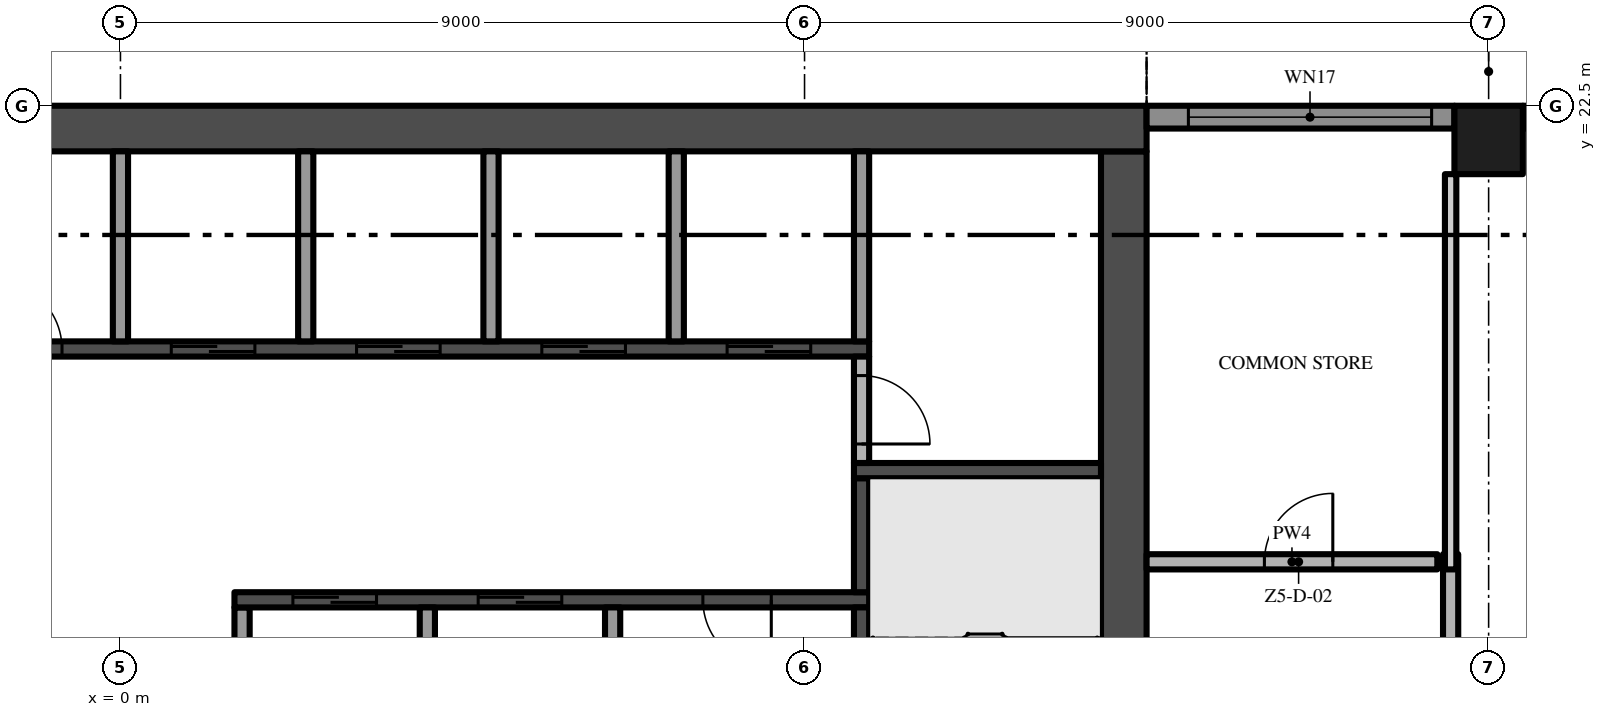
"""IFC4 building model, lengths in metres.
Left out: names, types, materials, properties, quantities, classifications, styles, units other than length and angle.
Written with IfcOpenShell. Run it as: python <this file> out.ifc"""

import sys

from ifc_helpers import new_model, si_unit, direction, frame, frame_2d, origin, origin_2d, place, context, subcontext, project, spatial, rectangle, extrude, element, fill, save


model = new_model("IFC4")
c1 = context("Model", 3, precision=1e-05, world=origin(), true_north=direction((0.0, 1.0)))
c2 = subcontext(c1, "Body", "Model", "MODEL_VIEW")
j1 = project(units=[si_unit("LENGTHUNIT", "METRE"), si_unit("PLANEANGLEUNIT", "RADIAN")], contexts=[c1])
p1 = place(None, origin())
s1 = spatial("IfcSite", under=j1, at=p1, CompositionType="ELEMENT")
p2 = place(p1, origin())
s2 = spatial("IfcBuilding", under=s1, at=p2, CompositionType="ELEMENT")
p3 = place(p2, frame((0.0, 0.0, 273.0)))
s3 = spatial("IfcBuildingStorey", under=s2, at=p3, CompositionType="ELEMENT", Elevation=273.0)
p4 = place(p3, frame((13.2, 5.1, -0.3), z_axis=(0.0, 0.0, 1.0), x_axis=(0.0, 1.0, 0.0)))
e1 = element("IfcWall", 1, at=p4, inside=s3, PredefinedType="SHEAR", context=c2, shape_type="SweptSolid", body=[
    extrude(rectangle(XDim=16.8, YDim=0.6, at=frame_2d((8.4, 0.0))), origin(), (0.0, 0.0, 1.0), 3.8),
])
p5 = place(p4, frame((6.3, 0.0, 0.3)))
e2 = element("IfcOpeningElement", 2, at=p5, cuts=e1, PredefinedType="OPENING", context=c2, shape_type="SweptSolid", body=[
    extrude(rectangle(XDim=1.2, YDim=2.2, at=frame_2d((0.6, 1.1))), frame((0.0, 0.31, 0.0), z_axis=(0.0, -1.0, 0.0), x_axis=(1.0, 0.0, 0.0)), (0.0, 0.0, 1.0), 0.62),
])
p6 = place(p3, frame((13.5, 22.2, -0.3), z_axis=(0.0, 0.0, 1.0), x_axis=(-1.0, 0.0, 0.0)))
e3 = element("IfcWall", 3, at=p6, inside=s3, PredefinedType="SHEAR", context=c2, shape_type="SweptSolid", body=[
    extrude(rectangle(XDim=27.0, YDim=0.6, at=frame_2d((13.5, 0.0))), origin(), (0.0, 0.0, 1.0), 3.8),
])
p7 = place(p3, frame((18.0, 22.05, 0.0), z_axis=(0.0, 0.0, 1.0), x_axis=(1.0, 0.0, 0.0)))
e4 = element("IfcColumn", 4, at=p7, inside=s3, PredefinedType="COLUMN", context=c2, shape_type="SweptSolid", body=[
    extrude(rectangle(XDim=0.9, YDim=0.9, at=origin_2d()), origin(), (0.0, 0.0, 1.0), 3.5),
])
p8 = place(p3, frame((18.45, 22.35, 0.0), z_axis=(0.0, 0.0, 1.0), x_axis=(1.0, 0.0, 0.0)))
e5 = element("IfcWall", 5, at=p8, inside=s3, PredefinedType="SOLIDWALL", context=c2, shape_type="SweptSolid", body=[
    extrude(rectangle(XDim=3.75, YDim=0.3, at=frame_2d((1.875, 0.0))), origin(), (0.0, 0.0, 1.0), 3.5),
])
p9 = place(p8, frame((0.3, 0.0, 0.0)))
e6 = element("IfcOpeningElement", 6, at=p9, cuts=e5, PredefinedType="OPENING", context=c2, shape_type="SweptSolid", body=[
    extrude(rectangle(XDim=3.15, YDim=2.4, at=frame_2d((1.575, 1.2))), frame((0.0, 0.16, 0.0), z_axis=(0.0, -1.0, 0.0), x_axis=(1.0, 0.0, 0.0)), (0.0, 0.0, 1.0), 0.32),
])
p10 = place(p3, frame((13.5, 22.35, 0.0), z_axis=(0.0, 0.0, 1.0), x_axis=(1.0, 0.0, 0.0)))
e7 = element("IfcWall", 7, at=p10, inside=s3, PredefinedType="SOLIDWALL", context=c2, shape_type="SweptSolid", body=[
    extrude(rectangle(XDim=4.05, YDim=0.3, at=frame_2d((2.025, 0.0))), origin(), (0.0, 0.0, 1.0), 3.5),
])
p11 = place(p10, frame((0.55, 0.0, 0.45)))
e8 = element("IfcOpeningElement", 8, at=p11, cuts=e7, PredefinedType="OPENING", context=c2, shape_type="SweptSolid", body=[
    extrude(rectangle(XDim=3.2, YDim=2.65, at=frame_2d((1.6, 1.325))), frame((0.0, 0.16, 0.0), z_axis=(0.0, -1.0, 0.0), x_axis=(1.0, 0.0, 0.0)), (0.0, 0.0, 1.0), 0.32),
])
p12 = place(p3, frame((-9.85, 19.3, 0.0), z_axis=(0.0, 0.0, 1.0), x_axis=(1.0, 0.0, 0.0)))
e9 = element("IfcWall", 9, at=p12, inside=s3, PredefinedType="SHEAR", context=c2, shape_type="SweptSolid", body=[
    extrude(rectangle(XDim=19.7, YDim=0.2, at=frame_2d((9.85, 0.0))), origin(), (0.0, 0.0, 1.0), 3.5),
])
p13 = place(p12, frame((10.519, 0.0, 0.0)))
e10 = element("IfcOpeningElement", 10, at=p13, cuts=e9, PredefinedType="OPENING", context=c2, shape_type="SweptSolid", body=[
    extrude(rectangle(XDim=1.1, YDim=2.1, at=frame_2d((0.55, 1.05))), frame((0.0, 0.11, 0.0), z_axis=(0.0, -1.0, 0.0), x_axis=(1.0, 0.0, 0.0)), (0.0, 0.0, 1.0), 0.22),
])
p14 = place(p12, frame((12.956, 0.0, 0.0)))
e11 = element("IfcOpeningElement", 11, at=p14, cuts=e9, PredefinedType="OPENING", context=c2, shape_type="SweptSolid", body=[
    extrude(rectangle(XDim=1.1, YDim=2.1, at=frame_2d((0.55, 1.05))), frame((0.0, 0.11, 0.0), z_axis=(0.0, -1.0, 0.0), x_axis=(1.0, 0.0, 0.0)), (0.0, 0.0, 1.0), 0.22),
])
p15 = place(p12, frame((15.394, 0.0, 0.0)))
e12 = element("IfcOpeningElement", 12, at=p15, cuts=e9, PredefinedType="OPENING", context=c2, shape_type="SweptSolid", body=[
    extrude(rectangle(XDim=1.1, YDim=2.1, at=frame_2d((0.55, 1.05))), frame((0.0, 0.11, 0.0), z_axis=(0.0, -1.0, 0.0), x_axis=(1.0, 0.0, 0.0)), (0.0, 0.0, 1.0), 0.22),
])
p16 = place(p12, frame((17.831, 0.0, 0.0)))
e13 = element("IfcOpeningElement", 13, at=p16, cuts=e9, PredefinedType="OPENING", context=c2, shape_type="SweptSolid", body=[
    extrude(rectangle(XDim=1.1, YDim=2.1, at=frame_2d((0.55, 1.05))), frame((0.0, 0.11, 0.0), z_axis=(0.0, -1.0, 0.0), x_axis=(1.0, 0.0, 0.0)), (0.0, 0.0, 1.0), 0.22),
])
p17 = place(p12, frame((0.869, 0.0, 0.0)))
e14 = element("IfcOpeningElement", 14, at=p17, cuts=e9, PredefinedType="OPENING", context=c2, shape_type="SweptSolid", body=[
    extrude(rectangle(XDim=0.9, YDim=2.1, at=frame_2d((0.45, 1.05))), frame((0.0, 0.11, 0.0), z_axis=(0.0, -1.0, 0.0), x_axis=(1.0, 0.0, 0.0)), (0.0, 0.0, 1.0), 0.22),
])
p18 = place(p12, frame((4.525, 0.0, 0.0)))
e15 = element("IfcOpeningElement", 15, at=p18, cuts=e9, PredefinedType="OPENING", context=c2, shape_type="SweptSolid", body=[
    extrude(rectangle(XDim=0.9, YDim=2.1, at=frame_2d((0.45, 1.05))), frame((0.0, 0.11, 0.0), z_axis=(0.0, -1.0, 0.0), x_axis=(1.0, 0.0, 0.0)), (0.0, 0.0, 1.0), 0.22),
])
p19 = place(p12, frame((8.181, 0.0, 0.0)))
e16 = element("IfcOpeningElement", 16, at=p19, cuts=e9, PredefinedType="OPENING", context=c2, shape_type="SweptSolid", body=[
    extrude(rectangle(XDim=0.9, YDim=2.1, at=frame_2d((0.45, 1.05))), frame((0.0, 0.11, 0.0), z_axis=(0.0, -1.0, 0.0), x_axis=(1.0, 0.0, 0.0)), (0.0, 0.0, 1.0), 0.22),
])
p20 = place(p3, frame((0.0, 19.4, 0.0), z_axis=(0.0, 0.0, 1.0), x_axis=(0.0, 1.0, 0.0)))
e17 = element("IfcWall", 17, at=p20, inside=s3, PredefinedType="PARTITIONING", context=c2, shape_type="SweptSolid", body=[
    extrude(rectangle(XDim=2.5, YDim=0.2, at=frame_2d((1.25, 0.0))), origin(), (0.0, 0.0, 1.0), 3.5),
])
p21 = place(p3, frame((1.6, 13.7, 0.0), z_axis=(0.0, 0.0, 1.0), x_axis=(0.0, 1.0, 0.0)))
e18 = element("IfcWall", 18, at=p21, inside=s3, PredefinedType="PARTITIONING", context=c2, shape_type="SweptSolid", body=[
    extrude(rectangle(XDim=2.2, YDim=0.2, at=frame_2d((1.1, 0.0))), origin(), (0.0, 0.0, 1.0), 3.5),
])
p22 = place(p3, frame((9.85, 16.0, 0.0), z_axis=(0.0, 0.0, 1.0), x_axis=(-1.0, 0.0, 0.0)))
e19 = element("IfcWall", 19, at=p22, inside=s3, PredefinedType="SHEAR", context=c2, shape_type="SweptSolid", body=[
    extrude(rectangle(XDim=8.35, YDim=0.2, at=frame_2d((4.175, 0.0))), origin(), (0.0, 0.0, 1.0), 3.5),
])
p23 = place(p22, frame((6.481, 0.0, 0.0)))
e20 = element("IfcOpeningElement", 20, at=p23, cuts=e19, PredefinedType="OPENING", context=c2, shape_type="SweptSolid", body=[
    extrude(rectangle(XDim=1.1, YDim=2.1, at=frame_2d((0.55, 1.05))), frame((0.0, 0.11, 0.0), z_axis=(0.0, -1.0, 0.0), x_axis=(1.0, 0.0, 0.0)), (0.0, 0.0, 1.0), 0.22),
])
p24 = place(p22, frame((4.044, 0.0, 0.0)))
e21 = element("IfcOpeningElement", 21, at=p24, cuts=e19, PredefinedType="OPENING", context=c2, shape_type="SweptSolid", body=[
    extrude(rectangle(XDim=1.1, YDim=2.1, at=frame_2d((0.55, 1.05))), frame((0.0, 0.11, 0.0), z_axis=(0.0, -1.0, 0.0), x_axis=(1.0, 0.0, 0.0)), (0.0, 0.0, 1.0), 0.22),
])
p25 = place(p22, frame((1.288, 0.0, 0.0)))
e22 = element("IfcOpeningElement", 22, at=p25, cuts=e19, PredefinedType="OPENING", context=c2, shape_type="SweptSolid", body=[
    extrude(rectangle(XDim=0.9, YDim=2.1, at=frame_2d((0.45, 1.05))), frame((0.0, 0.11, 0.0), z_axis=(0.0, -1.0, 0.0), x_axis=(1.0, 0.0, 0.0)), (0.0, 0.0, 1.0), 0.22),
])
p26 = place(p3, frame((2.438, 19.4, 0.0), z_axis=(0.0, 0.0, 1.0), x_axis=(0.0, 1.0, 0.0)))
e23 = element("IfcWall", 23, at=p26, inside=s3, PredefinedType="PARTITIONING", context=c2, shape_type="SweptSolid", body=[
    extrude(rectangle(XDim=2.5, YDim=0.2, at=frame_2d((1.25, 0.0))), origin(), (0.0, 0.0, 1.0), 3.5),
])
p27 = place(p3, frame((4.037, 13.7, 0.0), z_axis=(0.0, 0.0, 1.0), x_axis=(0.0, 1.0, 0.0)))
e24 = element("IfcWall", 24, at=p27, inside=s3, PredefinedType="PARTITIONING", context=c2, shape_type="SweptSolid", body=[
    extrude(rectangle(XDim=2.2, YDim=0.2, at=frame_2d((1.1, 0.0))), origin(), (0.0, 0.0, 1.0), 3.5),
])
p28 = place(p3, frame((4.875, 19.4, 0.0), z_axis=(0.0, 0.0, 1.0), x_axis=(0.0, 1.0, 0.0)))
e25 = element("IfcWall", 25, at=p28, inside=s3, PredefinedType="PARTITIONING", context=c2, shape_type="SweptSolid", body=[
    extrude(rectangle(XDim=2.5, YDim=0.2, at=frame_2d((1.25, 0.0))), origin(), (0.0, 0.0, 1.0), 3.5),
])
p29 = place(p3, frame((6.475, 13.7, 0.0), z_axis=(0.0, 0.0, 1.0), x_axis=(0.0, 1.0, 0.0)))
e26 = element("IfcWall", 26, at=p29, inside=s3, PredefinedType="PARTITIONING", context=c2, shape_type="SweptSolid", body=[
    extrude(rectangle(XDim=2.2, YDim=0.2, at=frame_2d((1.1, 0.0))), origin(), (0.0, 0.0, 1.0), 3.5),
])
p30 = place(p3, frame((7.312, 19.4, 0.0), z_axis=(0.0, 0.0, 1.0), x_axis=(0.0, 1.0, 0.0)))
e27 = element("IfcWall", 27, at=p30, inside=s3, PredefinedType="PARTITIONING", context=c2, shape_type="SweptSolid", body=[
    extrude(rectangle(XDim=2.5, YDim=0.2, at=frame_2d((1.25, 0.0))), origin(), (0.0, 0.0, 1.0), 3.5),
])
p31 = place(p3, frame((9.75, 12.3, 0.0), z_axis=(0.0, 0.0, 1.0), x_axis=(0.0, 1.0, 0.0)))
e28 = element("IfcWall", 28, at=p31, inside=s3, PredefinedType="SHEAR", context=c2, shape_type="SweptSolid", body=[
    extrude(rectangle(XDim=3.6, YDim=0.2, at=frame_2d((1.8, 0.0))), origin(), (0.0, 0.0, 1.0), 3.5),
])
p32 = place(p3, frame((9.75, 16.1, 0.0), z_axis=(0.0, 0.0, 1.0), x_axis=(0.0, 1.0, 0.0)))
e29 = element("IfcWall", 29, at=p32, inside=s3, PredefinedType="SHEAR", context=c2, shape_type="SweptSolid", body=[
    extrude(rectangle(XDim=1.5, YDim=0.2, at=frame_2d((0.75, 0.0))), origin(), (0.0, 0.0, 1.0), 3.5),
])
p33 = place(p3, frame((9.65, 17.7, 0.0), z_axis=(0.0, 0.0, 1.0), x_axis=(1.0, 0.0, 0.0)))
e30 = element("IfcWall", 30, at=p33, inside=s3, PredefinedType="SHEAR", context=c2, shape_type="SweptSolid", body=[
    extrude(rectangle(XDim=3.25, YDim=0.2, at=frame_2d((1.625, 0.0))), origin(), (0.0, 0.0, 1.0), 3.5),
])
p34 = place(p3, frame((9.75, 19.2, 0.0), z_axis=(0.0, 0.0, 1.0), x_axis=(0.0, -1.0, 0.0)))
e31 = element("IfcWall", 31, at=p34, inside=s3, PredefinedType="PARTITIONING", context=c2, shape_type="SweptSolid", body=[
    extrude(rectangle(XDim=1.4, YDim=0.2, at=frame_2d((0.7, 0.0))), origin(), (0.0, 0.0, 1.0), 3.5),
])
p35 = place(p34, frame((0.25, 0.0, 0.0)))
e32 = element("IfcOpeningElement", 32, at=p35, cuts=e31, PredefinedType="OPENING", context=c2, shape_type="SweptSolid", body=[
    extrude(rectangle(XDim=0.9, YDim=2.1, at=frame_2d((0.45, 1.05))), frame((0.0, 0.11, 0.0), z_axis=(0.0, -1.0, 0.0), x_axis=(1.0, 0.0, 0.0)), (0.0, 0.0, 1.0), 0.22),
])
p36 = place(p3, frame((9.75, 19.4, 0.0), z_axis=(0.0, 0.0, 1.0), x_axis=(0.0, 1.0, 0.0)))
e33 = element("IfcWall", 33, at=p36, inside=s3, PredefinedType="PARTITIONING", context=c2, shape_type="SweptSolid", body=[
    extrude(rectangle(XDim=2.5, YDim=0.2, at=frame_2d((1.25, 0.0))), origin(), (0.0, 0.0, 1.0), 3.5),
])
p37 = place(p3, frame((13.5, 16.5, 0.0), z_axis=(0.0, 0.0, 1.0), x_axis=(1.0, 0.0, 0.0)))
e34 = element("IfcWall", 34, at=p37, inside=s3, PredefinedType="PARTITIONING", context=c2, shape_type="SweptSolid", body=[
    extrude(rectangle(XDim=3.825, YDim=0.2, at=frame_2d((1.913, 0.0))), origin(), (0.0, 0.0, 1.0), 3.5),
])
p38 = place(p37, frame((1.55, 0.0, 0.0)))
e35 = element("IfcOpeningElement", 35, at=p38, cuts=e34, PredefinedType="OPENING", context=c2, shape_type="SweptSolid", body=[
    extrude(rectangle(XDim=0.9, YDim=2.1, at=frame_2d((0.45, 1.05))), frame((0.0, 0.11, 0.0), z_axis=(0.0, -1.0, 0.0), x_axis=(1.0, 0.0, 0.0)), (0.0, 0.0, 1.0), 0.22),
])
p39 = place(p3, frame((17.5, 13.975, 0.0), z_axis=(0.0, 0.0, 1.0), x_axis=(0.0, 1.0, 0.0)))
e36 = element("IfcWall", 36, at=p39, inside=s3, PredefinedType="PARTITIONING", context=c2, shape_type="SweptSolid", body=[
    extrude(rectangle(XDim=2.625, YDim=0.2, at=frame_2d((1.312, 0.0))), origin(), (0.0, 0.0, 1.0), 3.5),
])
p40 = place(p3, frame((17.5, 16.4, 0.0), z_axis=(0.0, 0.0, 1.0), x_axis=(0.0, 1.0, 0.0)))
e37 = element("IfcWall", 37, at=p40, inside=s3, PredefinedType="PARTITIONING", context=c2, shape_type="SweptSolid", body=[
    extrude(rectangle(XDim=5.2, YDim=0.15, at=frame_2d((2.6, 0.0))), origin(), (0.0, 0.0, 1.0), 3.5),
])
p41 = place(p11, origin())
e38 = element("IfcWindow", 38, at=p41, inside=s3, PartitioningType="SINGLE_PANEL", PredefinedType="WINDOW", context=c2, shape_type="SweptSolid", body=[
    extrude(rectangle(XDim=3.2, YDim=2.65, at=frame_2d((1.6, 1.325))), frame((0.0, 0.03, 0.0), z_axis=(0.0, -1.0, 0.0), x_axis=(1.0, 0.0, 0.0)), (0.0, 0.0, 1.0), 0.06),
])
fill(e8, e38)
p42 = place(p13, origin())
e39 = element("IfcDoor", 39, at=p42, inside=s3, OperationType="SLIDING_TO_RIGHT", PredefinedType="DOOR", context=c2, shape_type="SweptSolid", body=[
    extrude(rectangle(XDim=1.1, YDim=2.1, at=frame_2d((0.55, 1.05))), frame((0.0, 0.025, 0.0), z_axis=(0.0, -1.0, 0.0), x_axis=(1.0, 0.0, 0.0)), (0.0, 0.0, 1.0), 0.05),
])
fill(e10, e39)
p43 = place(p14, origin())
e40 = element("IfcDoor", 40, at=p43, inside=s3, OperationType="SLIDING_TO_RIGHT", PredefinedType="DOOR", context=c2, shape_type="SweptSolid", body=[
    extrude(rectangle(XDim=1.1, YDim=2.1, at=frame_2d((0.55, 1.05))), frame((0.0, 0.025, 0.0), z_axis=(0.0, -1.0, 0.0), x_axis=(1.0, 0.0, 0.0)), (0.0, 0.0, 1.0), 0.05),
])
fill(e11, e40)
p44 = place(p15, origin())
e41 = element("IfcDoor", 41, at=p44, inside=s3, OperationType="SLIDING_TO_RIGHT", PredefinedType="DOOR", context=c2, shape_type="SweptSolid", body=[
    extrude(rectangle(XDim=1.1, YDim=2.1, at=frame_2d((0.55, 1.05))), frame((0.0, 0.025, 0.0), z_axis=(0.0, -1.0, 0.0), x_axis=(1.0, 0.0, 0.0)), (0.0, 0.0, 1.0), 0.05),
])
fill(e12, e41)
p45 = place(p16, origin())
e42 = element("IfcDoor", 42, at=p45, inside=s3, OperationType="SLIDING_TO_RIGHT", PredefinedType="DOOR", context=c2, shape_type="SweptSolid", body=[
    extrude(rectangle(XDim=1.1, YDim=2.1, at=frame_2d((0.55, 1.05))), frame((0.0, 0.025, 0.0), z_axis=(0.0, -1.0, 0.0), x_axis=(1.0, 0.0, 0.0)), (0.0, 0.0, 1.0), 0.05),
])
fill(e13, e42)
p46 = place(p23, origin())
e43 = element("IfcDoor", 43, at=p46, inside=s3, OperationType="SLIDING_TO_RIGHT", PredefinedType="DOOR", context=c2, shape_type="SweptSolid", body=[
    extrude(rectangle(XDim=1.1, YDim=2.1, at=frame_2d((0.55, 1.05))), frame((0.0, 0.025, 0.0), z_axis=(0.0, -1.0, 0.0), x_axis=(1.0, 0.0, 0.0)), (0.0, 0.0, 1.0), 0.05),
])
fill(e20, e43)
p47 = place(p24, origin())
e44 = element("IfcDoor", 44, at=p47, inside=s3, OperationType="SLIDING_TO_RIGHT", PredefinedType="DOOR", context=c2, shape_type="SweptSolid", body=[
    extrude(rectangle(XDim=1.1, YDim=2.1, at=frame_2d((0.55, 1.05))), frame((0.0, 0.025, 0.0), z_axis=(0.0, -1.0, 0.0), x_axis=(1.0, 0.0, 0.0)), (0.0, 0.0, 1.0), 0.05),
])
fill(e21, e44)
p48 = place(p25, origin())
e45 = element("IfcDoor", 45, at=p48, inside=s3, OperationType="SINGLE_SWING_LEFT", PredefinedType="DOOR", context=c2, shape_type="SweptSolid", body=[
    extrude(rectangle(XDim=0.9, YDim=2.1, at=frame_2d((0.45, 1.05))), frame((0.0, 0.025, 0.0), z_axis=(0.0, -1.0, 0.0), x_axis=(1.0, 0.0, 0.0)), (0.0, 0.0, 1.0), 0.05),
])
fill(e22, e45)
p49 = place(p35, origin())
e46 = element("IfcDoor", 46, at=p49, inside=s3, OperationType="SINGLE_SWING_RIGHT", PredefinedType="DOOR", context=c2, shape_type="SweptSolid", body=[
    extrude(rectangle(XDim=0.9, YDim=2.1, at=frame_2d((0.45, 1.05))), frame((0.0, 0.025, 0.0), z_axis=(0.0, -1.0, 0.0), x_axis=(1.0, 0.0, 0.0)), (0.0, 0.0, 1.0), 0.05),
])
fill(e32, e46)
p50 = place(p19, origin())
e47 = element("IfcDoor", 47, at=p50, inside=s3, OperationType="SINGLE_SWING_LEFT", PredefinedType="DOOR", context=c2, shape_type="SweptSolid", body=[
    extrude(rectangle(XDim=0.9, YDim=2.1, at=frame_2d((0.45, 1.05))), frame((0.0, 0.025, 0.0), z_axis=(0.0, -1.0, 0.0), x_axis=(1.0, 0.0, 0.0)), (0.0, 0.0, 1.0), 0.05),
])
fill(e16, e47)
p51 = place(p38, origin())
e48 = element("IfcDoor", 48, at=p51, inside=s3, OperationType="SINGLE_SWING_RIGHT", PredefinedType="DOOR", context=c2, shape_type="SweptSolid", body=[
    extrude(rectangle(XDim=0.9, YDim=2.1, at=frame_2d((0.45, 1.05))), frame((0.0, 0.025, 0.0), z_axis=(0.0, -1.0, 0.0), x_axis=(1.0, 0.0, 0.0)), (0.0, 0.0, 1.0), 0.05),
])
fill(e35, e48)
save(model, sys.argv[1])
